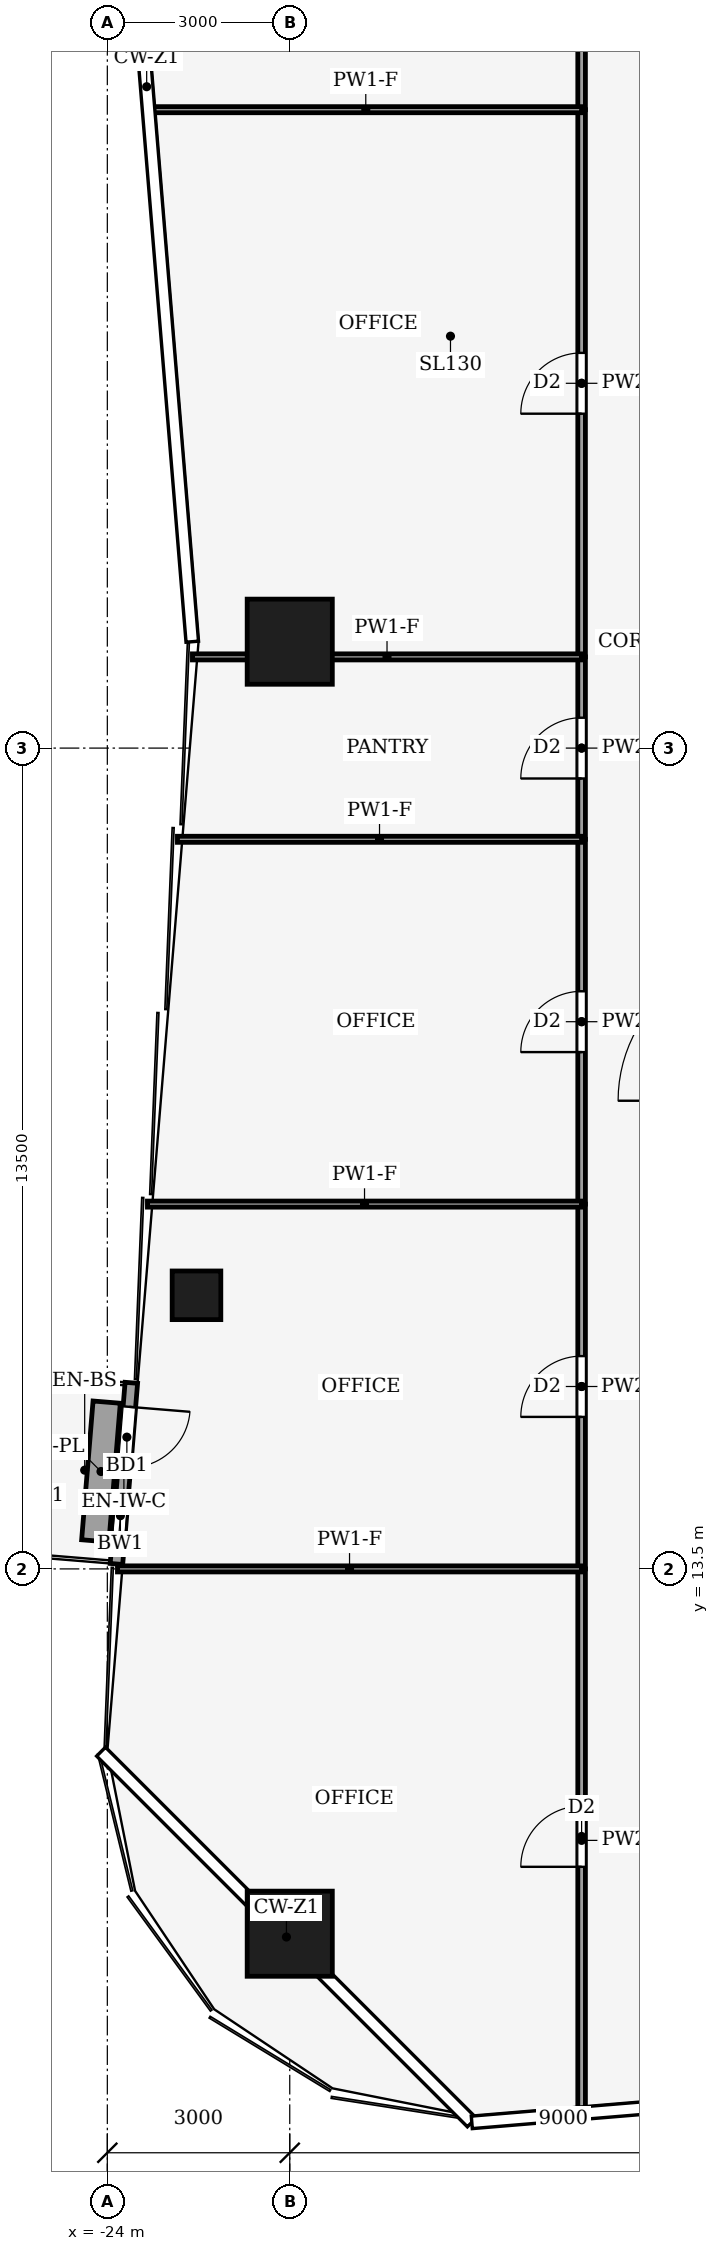
"""IFC4 building model, lengths in metres.
Left out: names, types, materials, properties, quantities, classifications, styles, units other than length and angle.
Written with IfcOpenShell. Run it as: python <this file> out.ifc"""

import sys

from ifc_helpers import new_model, si_unit, direction, frame, frame_2d, origin, origin_2d, place, context, subcontext, project, spatial, rectangle, hollow_rectangle, extrude, element, fill, save


model = new_model("IFC4")
c1 = context("Model", 3, precision=1e-05, world=origin(), true_north=direction((0.0, 1.0)))
c2 = subcontext(c1, "Body", "Model", "MODEL_VIEW")
j1 = project(units=[si_unit("LENGTHUNIT", "METRE"), si_unit("PLANEANGLEUNIT", "RADIAN")], contexts=[c1])
p1 = place(None, origin())
s1 = spatial("IfcSite", under=j1, at=p1, CompositionType="ELEMENT")
p2 = place(p1, origin())
s2 = spatial("IfcBuilding", under=s1, at=p2, CompositionType="ELEMENT")
p3 = place(p2, frame((0.0, 0.0, 78.0)))
s3 = spatial("IfcBuildingStorey", under=s2, at=p3, CompositionType="ELEMENT", Elevation=78.0)
for number, where, z_axis, x_axis in (
    (1, (-21.0, 7.5, 0.0), (0.0, 0.0, 1.0), (1.0, 0.0, 0.0)),
    (2, (-21.0, 28.75, 0.0), (0.0, 0.0, 1.0), (1.0, 0.0, 0.0)),
):
    element("IfcColumn", number, at=place(p3, frame(where, z_axis=z_axis, x_axis=x_axis)), inside=s3, PredefinedType="COLUMN", context=c2, shape_type="SweptSolid", body=[
        extrude(hollow_rectangle(XDim=1.4, YDim=1.4, WallThickness=0.08, at=origin_2d()), origin(), (0.0, 0.0, 1.0), 4.0),
    ])
p4 = place(p3, frame((-22.534, 18.0, 0.0), z_axis=(0.0, 0.0, 1.0), x_axis=(1.0, 0.0, 0.0)))
e3 = element("IfcColumn", 3, at=p4, inside=s3, PredefinedType="COLUMN", context=c2, shape_type="SweptSolid", body=[
    extrude(hollow_rectangle(XDim=0.8, YDim=0.8, WallThickness=0.04, at=origin_2d()), origin(), (0.0, 0.0, 1.0), 4.0),
])
p5 = place(p3, frame((-23.605, 16.561, 0.0), z_axis=(0.0, 0.0, 1.0), x_axis=(-0.081903334605, -0.996640278024, 0.0)))
e4 = element("IfcWall", 4, at=p5, inside=s3, PredefinedType="SOLIDWALL", context=c2, shape_type="SweptSolid", body=[
    extrude(rectangle(XDim=2.99, YDim=0.206, at=frame_2d((1.495, 0.0))), origin(), (0.0, 0.0, 1.0), 3.65),
])
p6 = place(p5, frame((0.396, 0.0, 0.0)))
e5 = element("IfcOpeningElement", 5, at=p6, cuts=e4, PredefinedType="OPENING", context=c2, shape_type="SweptSolid", body=[
    extrude(rectangle(XDim=1.0, YDim=2.1, at=frame_2d((0.5, 1.05))), frame((0.0, 0.113, 0.0), z_axis=(0.0, -1.0, 0.0), x_axis=(1.0, 0.0, 0.0)), (0.0, 0.0, 1.0), 0.226),
])
p7 = place(p5, frame((1.793, 0.0, 0.9)))
e6 = element("IfcOpeningElement", 6, at=p7, cuts=e4, PredefinedType="OPENING", context=c2, shape_type="SweptSolid", body=[
    extrude(rectangle(XDim=0.8, YDim=1.2, at=frame_2d((0.4, 0.6))), frame((0.0, 0.113, 0.0), z_axis=(0.0, -1.0, 0.0), x_axis=(1.0, 0.0, 0.0)), (0.0, 0.0, 1.0), 0.226),
])
p8 = place(p3, frame((-24.01, 16.243, 0.0), z_axis=(0.0, 0.0, 1.0), x_axis=(-0.081986639556, -0.996633428566, 0.0)))
e7 = element("IfcWall", 7, at=p8, inside=s3, PredefinedType="USERDEFINED", context=c2, shape_type="SweptSolid", body=[
    extrude(rectangle(XDim=2.29, YDim=0.45, at=frame_2d((1.145, 0.0))), origin(), (0.0, 0.0, 1.0), 0.4),
])
p9 = place(p3, frame((-16.2, 4.57, 0.0), z_axis=(0.0, 0.0, 1.0), x_axis=(0.0, 1.0, 0.0)))
e8 = element("IfcWall", 8, at=p9, inside=s3, PredefinedType="PARTITIONING", context=c2, shape_type="SweptSolid", body=[
    extrude(rectangle(XDim=8.93, YDim=0.125, at=frame_2d((4.465, 0.0))), origin(), (0.0, 0.0, 1.0), 3.04),
])
p10 = place(p9, frame((4.03, 0.0, 0.0)))
e9 = element("IfcOpeningElement", 9, at=p10, cuts=e8, PredefinedType="OPENING", context=c2, shape_type="SweptSolid", body=[
    extrude(rectangle(XDim=1.0, YDim=2.1, at=frame_2d((0.5, 1.05))), frame((0.0, 0.073, 0.0), z_axis=(0.0, -1.0, 0.0), x_axis=(1.0, 0.0, 0.0)), (0.0, 0.0, 1.0), 0.145),
])
p11 = place(p3, frame((-16.2, 13.5, 0.0), z_axis=(0.0, 0.0, 1.0), x_axis=(0.0, 1.0, 0.0)))
e10 = element("IfcWall", 10, at=p11, inside=s3, PredefinedType="PARTITIONING", context=c2, shape_type="SweptSolid", body=[
    extrude(rectangle(XDim=6.0, YDim=0.125, at=frame_2d((3.0, 0.0))), origin(), (0.0, 0.0, 1.0), 3.14),
])
p12 = place(p11, frame((2.5, 0.0, 0.0)))
e11 = element("IfcOpeningElement", 11, at=p12, cuts=e10, PredefinedType="OPENING", context=c2, shape_type="SweptSolid", body=[
    extrude(rectangle(XDim=1.0, YDim=2.1, at=frame_2d((0.5, 1.05))), frame((0.0, 0.073, 0.0), z_axis=(0.0, -1.0, 0.0), x_axis=(1.0, 0.0, 0.0)), (0.0, 0.0, 1.0), 0.145),
])
p13 = place(p3, frame((-16.2, 19.5, 0.0), z_axis=(0.0, 0.0, 1.0), x_axis=(0.0, 1.0, 0.0)))
e12 = element("IfcWall", 12, at=p13, inside=s3, PredefinedType="PARTITIONING", context=c2, shape_type="SweptSolid", body=[
    extrude(rectangle(XDim=6.0, YDim=0.125, at=frame_2d((3.0, 0.0))), origin(), (0.0, 0.0, 1.0), 3.48),
])
p14 = place(p13, frame((2.5, 0.0, 0.0)))
e13 = element("IfcOpeningElement", 13, at=p14, cuts=e12, PredefinedType="OPENING", context=c2, shape_type="SweptSolid", body=[
    extrude(rectangle(XDim=1.0, YDim=2.1, at=frame_2d((0.5, 1.05))), frame((0.0, 0.073, 0.0), z_axis=(0.0, -1.0, 0.0), x_axis=(1.0, 0.0, 0.0)), (0.0, 0.0, 1.0), 0.145),
])
p15 = place(p3, frame((-16.2, 25.5, 0.0), z_axis=(0.0, 0.0, 1.0), x_axis=(0.0, 1.0, 0.0)))
e14 = element("IfcWall", 14, at=p15, inside=s3, PredefinedType="PARTITIONING", context=c2, shape_type="SweptSolid", body=[
    extrude(rectangle(XDim=3.0, YDim=0.125, at=frame_2d((1.5, 0.0))), origin(), (0.0, 0.0, 1.0), 3.48),
])
p16 = place(p15, frame((1.0, 0.0, 0.0)))
e15 = element("IfcOpeningElement", 15, at=p16, cuts=e14, PredefinedType="OPENING", context=c2, shape_type="SweptSolid", body=[
    extrude(rectangle(XDim=1.0, YDim=2.1, at=frame_2d((0.5, 1.05))), frame((0.0, 0.073, 0.0), z_axis=(0.0, -1.0, 0.0), x_axis=(1.0, 0.0, 0.0)), (0.0, 0.0, 1.0), 0.145),
])
p17 = place(p3, frame((-16.2, 28.5, 0.0), z_axis=(0.0, 0.0, 1.0), x_axis=(0.0, 1.0, 0.0)))
e16 = element("IfcWall", 16, at=p17, inside=s3, PredefinedType="PARTITIONING", context=c2, shape_type="SweptSolid", body=[
    extrude(rectangle(XDim=9.0, YDim=0.125, at=frame_2d((4.5, 0.0))), origin(), (0.0, 0.0, 1.0), 3.48),
])
p18 = place(p17, frame((4.0, 0.0, 0.0)))
e17 = element("IfcOpeningElement", 17, at=p18, cuts=e16, PredefinedType="OPENING", context=c2, shape_type="SweptSolid", body=[
    extrude(rectangle(XDim=1.0, YDim=2.1, at=frame_2d((0.5, 1.05))), frame((0.0, 0.073, 0.0), z_axis=(0.0, -1.0, 0.0), x_axis=(1.0, 0.0, 0.0)), (0.0, 0.0, 1.0), 0.145),
])
p19 = place(p3, frame((-16.2, 37.5, 0.0), z_axis=(0.0, 0.0, 1.0), x_axis=(0.0, 1.0, 0.0)))
e18 = element("IfcWall", 18, at=p19, inside=s3, PredefinedType="PARTITIONING", context=c2, shape_type="SweptSolid", body=[
    extrude(rectangle(XDim=6.0, YDim=0.125, at=frame_2d((3.0, 0.0))), origin(), (0.0, 0.0, 1.0), 3.14),
])
p20 = place(p19, frame((2.5, 0.0, 0.0)))
e19 = element("IfcOpeningElement", 19, at=p20, cuts=e18, PredefinedType="OPENING", context=c2, shape_type="SweptSolid", body=[
    extrude(rectangle(XDim=1.0, YDim=2.1, at=frame_2d((0.5, 1.05))), frame((0.0, 0.073, 0.0), z_axis=(0.0, -1.0, 0.0), x_axis=(1.0, 0.0, 0.0)), (0.0, 0.0, 1.0), 0.145),
])
p21 = place(p3, frame((-16.2, 13.5, 0.0), z_axis=(0.0, 0.0, 1.0), x_axis=(-1.0, 0.0, 0.0)))
e20 = element("IfcWall", 20, at=p21, inside=s3, PredefinedType="PARTITIONING", context=c2, shape_type="SweptSolid", body=[
    extrude(rectangle(XDim=7.634, YDim=0.1, at=frame_2d((3.817, 0.0))), origin(), (0.0, 0.0, 1.0), 3.04),
])
p22 = place(p3, frame((-16.2, 19.5, 0.0), z_axis=(0.0, 0.0, 1.0), x_axis=(-1.0, 0.0, 0.0)))
e21 = element("IfcWall", 21, at=p22, inside=s3, PredefinedType="PARTITIONING", context=c2, shape_type="SweptSolid", body=[
    extrude(rectangle(XDim=7.14, YDim=0.1, at=frame_2d((3.57, 0.0))), origin(), (0.0, 0.0, 1.0), 3.04),
])
p23 = place(p3, frame((-16.2, 25.5, 0.0), z_axis=(0.0, 0.0, 1.0), x_axis=(-1.0, 0.0, 0.0)))
e22 = element("IfcWall", 22, at=p23, inside=s3, PredefinedType="PARTITIONING", context=c2, shape_type="SweptSolid", body=[
    extrude(rectangle(XDim=6.647, YDim=0.1, at=frame_2d((3.324, 0.0))), origin(), (0.0, 0.0, 1.0), 3.04),
])
p24 = place(p3, frame((-16.2, 28.5, 0.0), z_axis=(0.0, 0.0, 1.0), x_axis=(-1.0, 0.0, 0.0)))
e23 = element("IfcWall", 23, at=p24, inside=s3, PredefinedType="PARTITIONING", context=c2, shape_type="SweptSolid", body=[
    extrude(rectangle(XDim=6.401, YDim=0.1, at=frame_2d((3.2, 0.0))), origin(), (0.0, 0.0, 1.0), 3.04),
])
p25 = place(p3, frame((-16.2, 37.5, 0.0), z_axis=(0.0, 0.0, 1.0), x_axis=(-1.0, 0.0, 0.0)))
e24 = element("IfcWall", 24, at=p25, inside=s3, PredefinedType="PARTITIONING", context=c2, shape_type="SweptSolid", body=[
    extrude(rectangle(XDim=7.099, YDim=0.1, at=frame_2d((3.55, 0.0))), origin(), (0.0, 0.0, 1.0), 3.04),
])
p26 = place(p6, origin())
e25 = element("IfcDoor", 25, at=p26, inside=s3, OperationType="SINGLE_SWING_LEFT", PredefinedType="DOOR", context=c2, shape_type="SweptSolid", body=[
    extrude(rectangle(XDim=1.0, YDim=2.1, at=frame_2d((0.5, 1.05))), frame((0.0, 0.025, 0.0), z_axis=(0.0, -1.0, 0.0), x_axis=(1.0, 0.0, 0.0)), (0.0, 0.0, 1.0), 0.05),
])
fill(e5, e25)
p27 = place(p7, origin())
e26 = element("IfcWindow", 26, at=p27, inside=s3, PartitioningType="SINGLE_PANEL", PredefinedType="WINDOW", context=c2, shape_type="SweptSolid", body=[
    extrude(rectangle(XDim=0.8, YDim=1.2, at=frame_2d((0.4, 0.6))), frame((0.0, 0.03, 0.0), z_axis=(0.0, -1.0, 0.0), x_axis=(1.0, 0.0, 0.0)), (0.0, 0.0, 1.0), 0.06),
])
fill(e6, e26)
p28 = place(p10, origin())
e27 = element("IfcDoor", 27, at=p28, inside=s3, OperationType="SINGLE_SWING_RIGHT", PredefinedType="DOOR", context=c2, shape_type="SweptSolid", body=[
    extrude(rectangle(XDim=1.0, YDim=2.1, at=frame_2d((0.5, 1.05))), frame((0.0, 0.025, 0.0), z_axis=(0.0, -1.0, 0.0), x_axis=(1.0, 0.0, 0.0)), (0.0, 0.0, 1.0), 0.05),
])
fill(e9, e27)
p29 = place(p12, origin())
e28 = element("IfcDoor", 28, at=p29, inside=s3, OperationType="SINGLE_SWING_RIGHT", PredefinedType="DOOR", context=c2, shape_type="SweptSolid", body=[
    extrude(rectangle(XDim=1.0, YDim=2.1, at=frame_2d((0.5, 1.05))), frame((0.0, 0.025, 0.0), z_axis=(0.0, -1.0, 0.0), x_axis=(1.0, 0.0, 0.0)), (0.0, 0.0, 1.0), 0.05),
])
fill(e11, e28)
p30 = place(p14, origin())
e29 = element("IfcDoor", 29, at=p30, inside=s3, OperationType="SINGLE_SWING_LEFT", PredefinedType="DOOR", context=c2, shape_type="SweptSolid", body=[
    extrude(rectangle(XDim=1.0, YDim=2.1, at=frame_2d((0.5, 1.05))), frame((0.0, 0.025, 0.0), z_axis=(0.0, -1.0, 0.0), x_axis=(1.0, 0.0, 0.0)), (0.0, 0.0, 1.0), 0.05),
])
fill(e13, e29)
p31 = place(p16, origin())
e30 = element("IfcDoor", 30, at=p31, inside=s3, OperationType="SINGLE_SWING_RIGHT", PredefinedType="DOOR", context=c2, shape_type="SweptSolid", body=[
    extrude(rectangle(XDim=1.0, YDim=2.1, at=frame_2d((0.5, 1.05))), frame((0.0, 0.025, 0.0), z_axis=(0.0, -1.0, 0.0), x_axis=(1.0, 0.0, 0.0)), (0.0, 0.0, 1.0), 0.05),
])
fill(e15, e30)
p32 = place(p18, origin())
e31 = element("IfcDoor", 31, at=p32, inside=s3, OperationType="SINGLE_SWING_LEFT", PredefinedType="DOOR", context=c2, shape_type="SweptSolid", body=[
    extrude(rectangle(XDim=1.0, YDim=2.1, at=frame_2d((0.5, 1.05))), frame((0.0, 0.025, 0.0), z_axis=(0.0, -1.0, 0.0), x_axis=(1.0, 0.0, 0.0)), (0.0, 0.0, 1.0), 0.05),
])
fill(e17, e31)
save(model, sys.argv[1])
